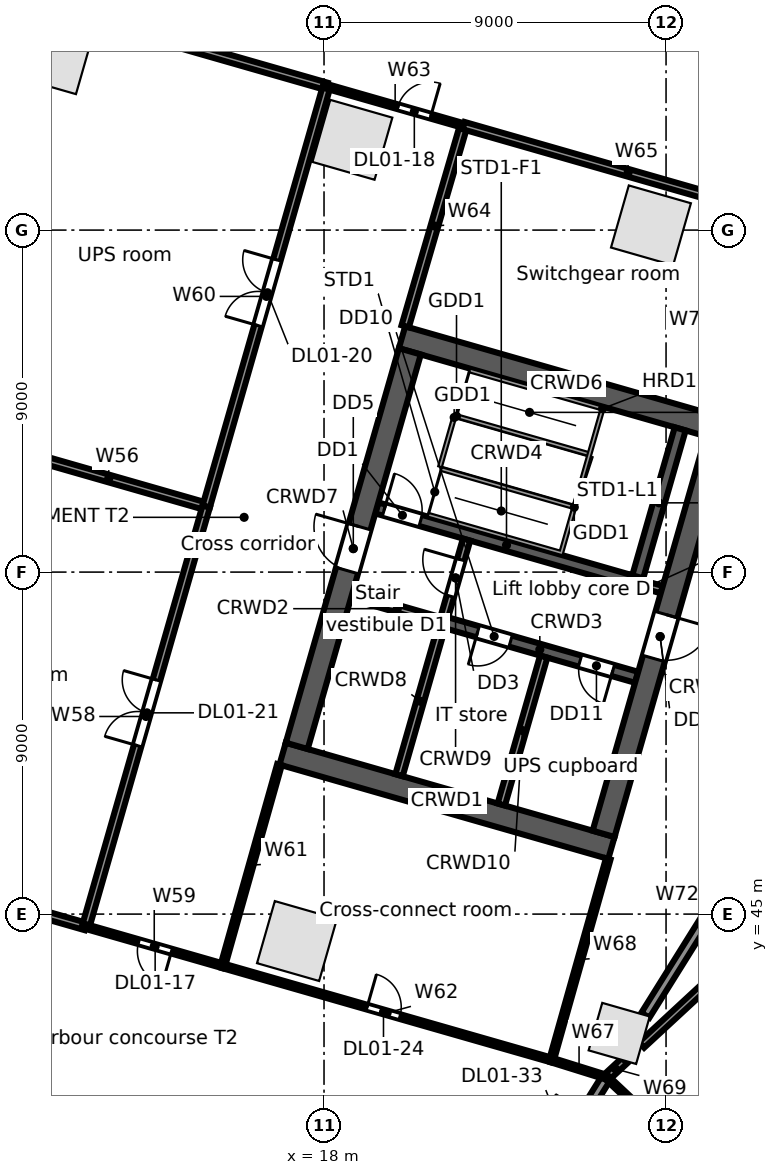
"""IFC4 building model, lengths in metres.
Left out: names, types, materials, properties, quantities, classifications, styles, units other than length and angle.
Written with IfcOpenShell. Run it as: python <this file> out.ifc"""

import sys

from ifc_helpers import new_model, si_unit, direction, frame, frame_2d, origin, origin_2d, place, context, subcontext, project, spatial, rectangle, extrude, element, fill, save


model = new_model("IFC4")
c1 = context("Model", 3, precision=1e-05, world=origin(), true_north=direction((0.0, 1.0)))
c2 = subcontext(c1, "Body", "Model", "MODEL_VIEW")
j1 = project(units=[si_unit("LENGTHUNIT", "METRE"), si_unit("PLANEANGLEUNIT", "RADIAN")], contexts=[c1])
p1 = place(None, origin())
s1 = spatial("IfcSite", under=j1, at=p1, CompositionType="ELEMENT")
p2 = place(p1, origin())
s2 = spatial("IfcBuilding", under=s1, at=p2, CompositionType="ELEMENT")
p3 = place(p2, frame((0.0, 0.0, 11.5)))
s3 = spatial("IfcBuildingStorey", under=s2, at=p3, CompositionType="ELEMENT", Elevation=11.5)
for number, where, z_axis, x_axis in (
    (1, (26.603, 63.124, 0.0), (0.0, 0.0, 1.0), (-0.961, 0.276, 0.0)),
    (2, (18.746, 65.376, 0.0), (0.0, 0.0, 1.0), (-0.961, 0.276, 0.0)),
    (3, (10.89, 67.629, 0.0), (0.0, 0.0, 1.0), (-0.961, 0.276, 0.0)),
    (4, (17.288, 44.291, 0.0), (0.0, 0.0, 1.0), (0.961, -0.276, 0.0)),
):
    element("IfcColumn", number, at=place(p3, frame(where, z_axis=z_axis, x_axis=x_axis)), inside=s3, PredefinedType="COLUMN", context=c2, shape_type="SweptSolid", body=[
        extrude(rectangle(XDim=1.7, YDim=1.7, at=origin_2d()), origin(), (0.0, 0.0, 1.0), 5.0),
    ])
p4 = place(p3, frame((25.767, 41.86, 0.0), z_axis=(0.0, 0.0, 1.0), x_axis=(0.961261695938, -0.275637355817, 0.0)))
e5 = element("IfcColumn", 5, at=p4, inside=s3, PredefinedType="COLUMN", context=c2, shape_type="SweptSolid", body=[
    extrude(rectangle(XDim=1.3, YDim=1.3, at=origin_2d()), origin(), (0.0, 0.0, 1.0), 5.0),
])
p5 = place(p3, frame((28.316, 68.25, 0.0), z_axis=(0.0, 0.0, 1.0), x_axis=(-0.961261695938, 0.275637355817, 0.0)))
e6 = element("IfcColumn", 6, at=p5, inside=s3, PredefinedType="COLUMN", context=c2, shape_type="SweptSolid", body=[
    extrude(rectangle(XDim=1.0, YDim=1.0, at=origin_2d()), origin(), (0.0, 0.0, 1.0), 5.0),
])
p6 = place(p3, frame((16.911, 49.221, 0.0), z_axis=(0.0, 0.0, 1.0), x_axis=(0.96126248289, -0.275634611374, 0.0)))
e7 = element("IfcWall", 7, at=p6, inside=s3, PredefinedType="SOLIDWALL", context=c2, shape_type="SweptSolid", body=[
    extrude(rectangle(XDim=9.0, YDim=0.6, at=frame_2d((4.5, 0.0))), origin(), (0.0, 0.0, 1.0), 4.65),
])
p7 = place(p3, frame((18.728, 53.382, 0.0), z_axis=(0.0, 0.0, 1.0), x_axis=(0.961247070632, -0.275688355216, 0.0)))
e8 = element("IfcWall", 8, at=p7, inside=s3, PredefinedType="SOLIDWALL", context=c2, shape_type="SweptSolid", body=[
    extrude(rectangle(XDim=2.5, YDim=0.2, at=frame_2d((1.25, 0.0))), origin(), (0.0, 0.0, 1.0), 4.65),
])
p8 = place(p3, frame((21.131, 52.692, 0.0), z_axis=(0.0, 0.0, 1.0), x_axis=(0.961271492568, -0.275603188616, 0.0)))
e9 = element("IfcWall", 9, at=p8, inside=s3, PredefinedType="SOLIDWALL", context=c2, shape_type="SweptSolid", body=[
    extrude(rectangle(XDim=5.3, YDim=0.3, at=frame_2d((2.65, 0.0))), origin(), (0.0, 0.0, 1.0), 4.65),
])
p9 = place(p8, frame((0.95, 0.0, 0.0)))
e10 = element("IfcOpeningElement", 10, at=p9, cuts=e9, PredefinedType="OPENING", context=c2, shape_type="SweptSolid", body=[
    extrude(rectangle(XDim=0.9, YDim=2.1, at=frame_2d((0.45, 1.05))), frame((0.0, 0.16, 0.0), z_axis=(0.0, -1.0, 0.0), x_axis=(1.0, 0.0, 0.0)), (0.0, 0.0, 1.0), 0.32),
])
p10 = place(p8, frame((3.75, 0.0, 0.0)))
e11 = element("IfcOpeningElement", 11, at=p10, cuts=e9, PredefinedType="OPENING", context=c2, shape_type="SweptSolid", body=[
    extrude(rectangle(XDim=0.9, YDim=2.1, at=frame_2d((0.45, 1.05))), frame((0.0, 0.16, 0.0), z_axis=(0.0, -1.0, 0.0), x_axis=(1.0, 0.0, 0.0)), (0.0, 0.0, 1.0), 0.32),
])
p11 = place(p3, frame((19.389, 55.689, 0.0), z_axis=(0.0, 0.0, 1.0), x_axis=(0.961261397636, -0.275638396117, 0.0)))
e12 = element("IfcWall", 12, at=p11, inside=s3, PredefinedType="SOLIDWALL", context=c2, shape_type="SweptSolid", body=[
    extrude(rectangle(XDim=7.1, YDim=0.3, at=frame_2d((3.55, 0.0))), origin(), (0.0, 0.0, 1.0), 4.65),
])
p12 = place(p11, frame((0.2, 0.0, 0.0)))
e13 = element("IfcOpeningElement", 13, at=p12, cuts=e12, PredefinedType="OPENING", context=c2, shape_type="SweptSolid", body=[
    extrude(rectangle(XDim=1.0, YDim=2.1, at=frame_2d((0.5, 1.05))), frame((0.0, 0.16, 0.0), z_axis=(0.0, -1.0, 0.0), x_axis=(1.0, 0.0, 0.0)), (0.0, 0.0, 1.0), 0.32),
])
p13 = place(p3, frame((26.214, 53.732, 0.0), z_axis=(0.0, 0.0, 1.0), x_axis=(0.96122076476, -0.27578005982, 0.0)))
e14 = element("IfcWall", 14, at=p13, inside=s3, PredefinedType="SOLIDWALL", context=c2, shape_type="SweptSolid", body=[
    extrude(rectangle(XDim=0.7, YDim=0.2, at=frame_2d((0.35, 0.0))), origin(), (0.0, 0.0, 1.0), 4.65),
])
p14 = place(p3, frame((20.053, 60.18, 0.0), z_axis=(0.0, 0.0, 1.0), x_axis=(0.96126248289, -0.275634611374, 0.0)))
e15 = element("IfcWall", 15, at=p14, inside=s3, PredefinedType="SOLIDWALL", context=c2, shape_type="SweptSolid", body=[
    extrude(rectangle(XDim=9.0, YDim=0.6, at=frame_2d((4.5, 0.0))), origin(), (0.0, 0.0, 1.0), 4.65),
])
p15 = place(p3, frame((17.282, 49.427, 0.0), z_axis=(0.0, 0.0, 1.0), x_axis=(0.275631631629, 0.961263337304, 0.0)))
e16 = element("IfcWall", 16, at=p15, inside=s3, PredefinedType="SOLIDWALL", context=c2, shape_type="SweptSolid", body=[
    extrude(rectangle(XDim=10.8, YDim=0.6, at=frame_2d((5.4, 0.0))), origin(), (0.0, 0.0, 1.0), 4.65),
])
p16 = place(p15, frame((4.8, 0.0, 0.0)))
e17 = element("IfcOpeningElement", 17, at=p16, cuts=e16, PredefinedType="OPENING", context=c2, shape_type="SweptSolid", body=[
    extrude(rectangle(XDim=1.2, YDim=2.1, at=frame_2d((0.6, 1.05))), frame((0.0, 0.31, 0.0), z_axis=(0.0, -1.0, 0.0), x_axis=(1.0, 0.0, 0.0)), (0.0, 0.0, 1.0), 0.62),
])
p17 = place(p3, frame((19.973, 48.655, 0.0), z_axis=(0.0, 0.0, 1.0), x_axis=(0.275668441653, 0.961252781674, 0.0)))
e18 = element("IfcWall", 18, at=p17, inside=s3, PredefinedType="SOLIDWALL", context=c2, shape_type="SweptSolid", body=[
    extrude(rectangle(XDim=4.05, YDim=0.2, at=frame_2d((2.025, 0.0))), origin(), (0.0, 0.0, 1.0), 4.65),
])
p18 = place(p3, frame((21.172, 52.837, 0.0), z_axis=(0.0, 0.0, 1.0), x_axis=(0.275657676022, 0.961255868981, 0.0)))
e19 = element("IfcWall", 19, at=p18, inside=s3, PredefinedType="PARTITIONING", context=c2, shape_type="SweptSolid", body=[
    extrude(rectangle(XDim=2.1, YDim=0.2, at=frame_2d((1.05, 0.0))), origin(), (0.0, 0.0, 1.0), 4.65),
])
p19 = place(p18, frame((0.55, 0.0, 0.0)))
e20 = element("IfcOpeningElement", 20, at=p19, cuts=e19, PredefinedType="OPENING", context=c2, shape_type="SweptSolid", body=[
    extrude(rectangle(XDim=1.0, YDim=2.1, at=frame_2d((0.5, 1.05))), frame((0.0, 0.11, 0.0), z_axis=(0.0, -1.0, 0.0), x_axis=(1.0, 0.0, 0.0)), (0.0, 0.0, 1.0), 0.22),
])
p20 = place(p3, frame((22.665, 47.883, 0.0), z_axis=(0.0, 0.0, 1.0), x_axis=(0.275596769212, 0.961273333033, 0.0)))
e21 = element("IfcWall", 21, at=p20, inside=s3, PredefinedType="PARTITIONING", context=c2, shape_type="SweptSolid", body=[
    extrude(rectangle(XDim=4.05, YDim=0.2, at=frame_2d((2.025, 0.0))), origin(), (0.0, 0.0, 1.0), 4.65),
])
p21 = place(p3, frame((26.256, 53.876, 0.0), z_axis=(0.0, 0.0, 1.0), x_axis=(0.275612739511, 0.961268754209, 0.0)))
e22 = element("IfcWall", 22, at=p21, inside=s3, PredefinedType="SOLIDWALL", context=c2, shape_type="SweptSolid", body=[
    extrude(rectangle(XDim=4.05, YDim=0.3, at=frame_2d((2.025, 0.0))), origin(), (0.0, 0.0, 1.0), 4.65),
])
p22 = place(p3, frame((25.356, 47.112, 0.0), z_axis=(0.0, 0.0, 1.0), x_axis=(0.275631631629, 0.961263337304, 0.0)))
e23 = element("IfcWall", 23, at=p22, inside=s3, PredefinedType="SOLIDWALL", context=c2, shape_type="SweptSolid", body=[
    extrude(rectangle(XDim=10.8, YDim=0.6, at=frame_2d((5.4, 0.0))), origin(), (0.0, 0.0, 1.0), 4.65),
])
p23 = place(p22, frame((4.8, 0.0, 0.0)))
e24 = element("IfcOpeningElement", 24, at=p23, cuts=e23, PredefinedType="OPENING", context=c2, shape_type="SweptSolid", body=[
    extrude(rectangle(XDim=1.2, YDim=2.1, at=frame_2d((0.6, 1.05))), frame((0.0, 0.31, 0.0), z_axis=(0.0, -1.0, 0.0), x_axis=(1.0, 0.0, 0.0)), (0.0, 0.0, 1.0), 0.62),
])
p24 = place(p3, frame((4.28, 46.809, 0.0), z_axis=(0.0, 0.0, 1.0), x_axis=(0.961270337968, -0.275607215693, 0.0)))
e25 = element("IfcWall", 25, at=p24, inside=s3, PredefinedType="PARTITIONING", context=c2, shape_type="SweptSolid", body=[
    extrude(rectangle(XDim=7.75, YDim=0.2, at=frame_2d((3.875, 0.0))), origin(), (0.0, 0.0, 1.0), 4.03),
])
p25 = place(p3, frame((9.77, 57.199, 0.0), z_axis=(0.0, 0.0, 1.0), x_axis=(0.961262835898, -0.275633380273, 0.0)))
e26 = element("IfcWall", 26, at=p25, inside=s3, PredefinedType="PARTITIONING", context=c2, shape_type="SweptSolid", body=[
    extrude(rectangle(XDim=5.337, YDim=0.2, at=frame_2d((2.668, 0.0))), origin(), (0.0, 0.0, 1.0), 3.712),
])
p26 = place(p3, frame((10.62, 68.918, 0.0), z_axis=(0.0, 0.0, 1.0), x_axis=(0.961260764876, -0.275640602796, 0.0)))
e27 = element("IfcWall", 27, at=p26, inside=s3, PredefinedType="PARTITIONING", context=c2, shape_type="SweptSolid", body=[
    extrude(rectangle(XDim=7.749, YDim=0.2, at=frame_2d((3.875, 0.0))), origin(), (0.0, 0.0, 1.0), 3.712),
])
p27 = place(p3, frame((11.73, 44.673, 0.0), z_axis=(0.0, 0.0, 1.0), x_axis=(0.275635044812, 0.961262358605, 0.0)))
e28 = element("IfcWall", 28, at=p27, inside=s3, PredefinedType="PARTITIONING", context=c2, shape_type="SweptSolid", body=[
    extrude(rectangle(XDim=11.5, YDim=0.2, at=frame_2d((5.75, 0.0))), origin(), (0.0, 0.0, 1.0), 3.712),
])
p28 = place(p27, frame((4.95, 0.0, 0.0)))
e29 = element("IfcOpeningElement", 29, at=p28, cuts=e28, PredefinedType="OPENING", context=c2, shape_type="SweptSolid", body=[
    extrude(rectangle(XDim=1.8, YDim=2.1, at=frame_2d((0.9, 1.05))), frame((0.0, 0.11, 0.0), z_axis=(0.0, -1.0, 0.0), x_axis=(1.0, 0.0, 0.0)), (0.0, 0.0, 1.0), 0.22),
])
p29 = place(p3, frame((11.73, 44.673, 0.0), z_axis=(0.0, 0.0, 1.0), x_axis=(0.961228613303, -0.275752702557, 0.0)))
e30 = element("IfcWall", 30, at=p29, inside=s3, PredefinedType="PARTITIONING", context=c2, shape_type="SweptSolid", body=[
    extrude(rectangle(XDim=3.75, YDim=0.125, at=frame_2d((1.875, 0.0))), origin(), (0.0, 0.0, 1.0), 4.65),
])
p30 = place(p29, frame((1.45, 0.0, 0.0)))
e31 = element("IfcOpeningElement", 31, at=p30, cuts=e30, PredefinedType="OPENING", context=c2, shape_type="SweptSolid", body=[
    extrude(rectangle(XDim=0.9, YDim=2.1, at=frame_2d((0.45, 1.05))), frame((0.0, 0.073, 0.0), z_axis=(0.0, -1.0, 0.0), x_axis=(1.0, 0.0, 0.0)), (0.0, 0.0, 1.0), 0.145),
])
p31 = place(p3, frame((14.9, 55.728, 0.0), z_axis=(0.0, 0.0, 1.0), x_axis=(0.27559869205, 0.961272781754, 0.0)))
e32 = element("IfcWall", 32, at=p31, inside=s3, PredefinedType="PARTITIONING", context=c2, shape_type="SweptSolid", body=[
    extrude(rectangle(XDim=11.499, YDim=0.2, at=frame_2d((5.75, 0.0))), origin(), (0.0, 0.0, 1.0), 3.712),
])
p32 = place(p31, frame((4.95, 0.0, 0.0)))
e33 = element("IfcOpeningElement", 33, at=p32, cuts=e32, PredefinedType="OPENING", context=c2, shape_type="SweptSolid", body=[
    extrude(rectangle(XDim=1.8, YDim=2.1, at=frame_2d((0.9, 1.05))), frame((0.0, 0.11, 0.0), z_axis=(0.0, -1.0, 0.0), x_axis=(1.0, 0.0, 0.0)), (0.0, 0.0, 1.0), 0.22),
])
p33 = place(p3, frame((15.335, 43.639, 0.0), z_axis=(0.0, 0.0, 1.0), x_axis=(0.271407455373, 0.962464541252, 0.0)))
e34 = element("IfcWall", 34, at=p33, inside=s3, PredefinedType="PARTITIONING", context=c2, shape_type="SweptSolid", body=[
    extrude(rectangle(XDim=5.501, YDim=0.125, at=frame_2d((2.75, 0.0))), origin(), (0.0, 0.0, 1.0), 3.93),
])
p34 = place(p3, frame((15.335, 43.639, 0.0), z_axis=(0.0, 0.0, 1.0), x_axis=(0.961281982754, -0.275566597455, 0.0)))
e35 = element("IfcWall", 35, at=p34, inside=s3, PredefinedType="PARTITIONING", context=c2, shape_type="SweptSolid", body=[
    extrude(rectangle(XDim=9.0, YDim=0.125, at=frame_2d((4.5, 0.0))), origin(), (0.0, 0.0, 1.0), 3.822),
])
p35 = place(p34, frame((3.95, 0.0, 0.0)))
e36 = element("IfcOpeningElement", 36, at=p35, cuts=e35, PredefinedType="OPENING", context=c2, shape_type="SweptSolid", body=[
    extrude(rectangle(XDim=0.9, YDim=2.1, at=frame_2d((0.45, 1.05))), frame((0.0, 0.073, 0.0), z_axis=(0.0, -1.0, 0.0), x_axis=(1.0, 0.0, 0.0)), (0.0, 0.0, 1.0), 0.145),
])
p36 = place(p3, frame((18.069, 66.782, 0.0), z_axis=(0.0, 0.0, 1.0), x_axis=(0.961314848061, -0.275451924837, 0.0)))
e37 = element("IfcWall", 37, at=p36, inside=s3, PredefinedType="PARTITIONING", context=c2, shape_type="SweptSolid", body=[
    extrude(rectangle(XDim=3.75, YDim=0.125, at=frame_2d((1.875, 0.0))), origin(), (0.0, 0.0, 1.0), 3.712),
])
p37 = place(p36, frame((1.95, 0.0, 0.0)))
e38 = element("IfcOpeningElement", 38, at=p37, cuts=e37, PredefinedType="OPENING", context=c2, shape_type="SweptSolid", body=[
    extrude(rectangle(XDim=0.9, YDim=2.1, at=frame_2d((0.45, 1.05))), frame((0.0, 0.073, 0.0), z_axis=(0.0, -1.0, 0.0), x_axis=(1.0, 0.0, 0.0)), (0.0, 0.0, 1.0), 0.145),
])
p38 = place(p3, frame((20.136, 60.468, 0.0), z_axis=(0.0, 0.0, 1.0), x_axis=(0.279630121779, 0.96010780384, 0.0)))
e39 = element("IfcWall", 39, at=p38, inside=s3, PredefinedType="PARTITIONING", context=c2, shape_type="SweptSolid", body=[
    extrude(rectangle(XDim=5.5, YDim=0.2, at=frame_2d((2.75, 0.0))), origin(), (0.0, 0.0, 1.0), 4.018),
])
p39 = place(p3, frame((21.674, 65.749, 0.0), z_axis=(0.0, 0.0, 1.0), x_axis=(0.961259417468, -0.275645301662, 0.0)))
e40 = element("IfcWall", 40, at=p39, inside=s3, PredefinedType="PARTITIONING", context=c2, shape_type="SweptSolid", body=[
    extrude(rectangle(XDim=9.0, YDim=0.2, at=frame_2d((4.5, 0.0))), origin(), (0.0, 0.0, 1.0), 3.822),
])
p40 = place(p3, frame((23.397, 37.442, 0.0), z_axis=(0.0, 0.0, 1.0), x_axis=(0.529805058875, 0.848119448893, 0.0)))
e41 = element("IfcWall", 41, at=p40, inside=s3, PredefinedType="PARTITIONING", context=c2, shape_type="SweptSolid", body=[
    extrude(rectangle(XDim=3.849, YDim=0.25, at=frame_2d((1.924, 0.0))), origin(), (0.0, 0.0, 1.0), 3.712),
])
p41 = place(p40, frame((0.95, 0.0, 0.0)))
e42 = element("IfcOpeningElement", 42, at=p41, cuts=e41, PredefinedType="OPENING", context=c2, shape_type="SweptSolid", body=[
    extrude(rectangle(XDim=1.8, YDim=2.1, at=frame_2d((0.9, 1.05))), frame((0.0, 0.135, 0.0), z_axis=(0.0, -1.0, 0.0), x_axis=(1.0, 0.0, 0.0)), (0.0, 0.0, 1.0), 0.27),
])
p42 = place(p3, frame((23.986, 41.159, 0.0), z_axis=(0.0, 0.0, 1.0), x_axis=(0.954522865266, -0.298137719325, 0.0)))
e43 = element("IfcWall", 43, at=p42, inside=s3, PredefinedType="PARTITIONING", context=c2, shape_type="SweptSolid", body=[
    extrude(rectangle(XDim=1.519, YDim=0.125, at=frame_2d((0.76, 0.0))), origin(), (0.0, 0.0, 1.0), 3.712),
])
p43 = place(p3, frame((23.986, 41.159, 0.0), z_axis=(0.0, 0.0, 1.0), x_axis=(0.271465437068, 0.962448188983, 0.0)))
e44 = element("IfcWall", 44, at=p43, inside=s3, PredefinedType="PARTITIONING", context=c2, shape_type="SweptSolid", body=[
    extrude(rectangle(XDim=5.5, YDim=0.125, at=frame_2d((2.75, 0.0))), origin(), (0.0, 0.0, 1.0), 3.93),
])
p44 = place(p3, frame((25.436, 40.706, 0.0), z_axis=(0.0, 0.0, 1.0), x_axis=(0.733725630695, 0.679445876329, 0.0)))
e45 = element("IfcWall", 45, at=p44, inside=s3, PredefinedType="PARTITIONING", context=c2, shape_type="SweptSolid", body=[
    extrude(rectangle(XDim=0.643, YDim=0.2, at=frame_2d((0.322, 0.0))), origin(), (0.0, 0.0, 1.0), 4.65),
])
p45 = place(p3, frame((25.436, 40.706, 0.0), z_axis=(0.0, 0.0, 1.0), x_axis=(0.729011488135, -0.684501461041, 0.0)))
e46 = element("IfcWall", 46, at=p45, inside=s3, PredefinedType="PARTITIONING", context=c2, shape_type="SweptSolid", body=[
    extrude(rectangle(XDim=4.202, YDim=0.125, at=frame_2d((2.101, 0.0))), origin(), (0.0, 0.0, 1.0), 4.65),
])
p46 = place(p45, frame((1.7, 0.0, 0.0)))
e47 = element("IfcOpeningElement", 47, at=p46, cuts=e46, PredefinedType="OPENING", context=c2, shape_type="SweptSolid", body=[
    extrude(rectangle(XDim=0.9, YDim=2.1, at=frame_2d((0.45, 1.05))), frame((0.0, 0.073, 0.0), z_axis=(0.0, -1.0, 0.0), x_axis=(1.0, 0.0, 0.0)), (0.0, 0.0, 1.0), 0.145),
])
p47 = place(p3, frame((26.356, 41.557, 0.0), z_axis=(0.0, 0.0, 1.0), x_axis=(0.734047402287, 0.679098233834, 0.0)))
e48 = element("IfcWall", 48, at=p47, inside=s3, PredefinedType="PARTITIONING", context=c2, shape_type="SweptSolid", body=[
    extrude(rectangle(XDim=21.926, YDim=0.2, at=frame_2d((10.963, 0.0))), origin(), (0.0, 0.0, 1.0), 3.73),
])
p48 = place(p47, frame((9.95, 0.0, 0.0)))
e49 = element("IfcOpeningElement", 49, at=p48, cuts=e48, PredefinedType="OPENING", context=c2, shape_type="SweptSolid", body=[
    extrude(rectangle(XDim=1.8, YDim=2.1, at=frame_2d((0.9, 1.05))), frame((0.0, 0.11, 0.0), z_axis=(0.0, -1.0, 0.0), x_axis=(1.0, 0.0, 0.0)), (0.0, 0.0, 1.0), 0.22),
])
p49 = place(p3, frame((26.456, 42.338, 0.0), z_axis=(0.0, 0.0, 1.0), x_axis=(0.529836963461, 0.848099517834, 0.0)))
e50 = element("IfcWall", 50, at=p49, inside=s3, PredefinedType="PARTITIONING", context=c2, shape_type="SweptSolid", body=[
    extrude(rectangle(XDim=5.826, YDim=0.25, at=frame_2d((2.913, 0.0))), origin(), (0.0, 0.0, 1.0), 3.712),
])
p50 = place(p12, origin())
e51 = element("IfcDoor", 51, at=p50, inside=s3, OperationType="SINGLE_SWING_LEFT", PredefinedType="DOOR", context=c2, shape_type="SweptSolid", body=[
    extrude(rectangle(XDim=1.0, YDim=2.1, at=frame_2d((0.5, 1.05))), frame((0.0, 0.025, 0.0), z_axis=(0.0, -1.0, 0.0), x_axis=(1.0, 0.0, 0.0)), (0.0, 0.0, 1.0), 0.05),
])
fill(e13, e51)
p51 = place(p19, origin())
e52 = element("IfcDoor", 52, at=p51, inside=s3, OperationType="SINGLE_SWING_RIGHT", PredefinedType="DOOR", context=c2, shape_type="SweptSolid", body=[
    extrude(rectangle(XDim=1.0, YDim=2.1, at=frame_2d((0.5, 1.05))), frame((0.0, 0.025, 0.0), z_axis=(0.0, -1.0, 0.0), x_axis=(1.0, 0.0, 0.0)), (0.0, 0.0, 1.0), 0.05),
])
fill(e20, e52)
p52 = place(p16, origin())
e53 = element("IfcDoor", 53, at=p52, inside=s3, OperationType="SINGLE_SWING_RIGHT", PredefinedType="DOOR", context=c2, shape_type="SweptSolid", body=[
    extrude(rectangle(XDim=1.2, YDim=2.1, at=frame_2d((0.6, 1.05))), frame((0.0, 0.025, 0.0), z_axis=(0.0, -1.0, 0.0), x_axis=(1.0, 0.0, 0.0)), (0.0, 0.0, 1.0), 0.05),
])
fill(e17, e53)
p53 = place(p23, frame((1.2, 0.0, 0.0), z_axis=(0.0, 0.0, 1.0), x_axis=(-1.0, 0.0, 0.0)))
e54 = element("IfcDoor", 54, at=p53, inside=s3, OperationType="SINGLE_SWING_LEFT", PredefinedType="DOOR", context=c2, shape_type="SweptSolid", body=[
    extrude(rectangle(XDim=1.2, YDim=2.1, at=frame_2d((0.6, 1.05))), frame((0.0, 0.025, 0.0), z_axis=(0.0, -1.0, 0.0), x_axis=(1.0, 0.0, 0.0)), (0.0, 0.0, 1.0), 0.05),
])
fill(e24, e54)
p54 = place(p9, frame((0.9, 0.0, 0.0), z_axis=(0.0, 0.0, 1.0), x_axis=(-1.0, 0.0, 0.0)))
e55 = element("IfcDoor", 55, at=p54, inside=s3, OperationType="SINGLE_SWING_RIGHT", PredefinedType="DOOR", context=c2, shape_type="SweptSolid", body=[
    extrude(rectangle(XDim=0.9, YDim=2.1, at=frame_2d((0.45, 1.05))), frame((0.0, 0.025, 0.0), z_axis=(0.0, -1.0, 0.0), x_axis=(1.0, 0.0, 0.0)), (0.0, 0.0, 1.0), 0.05),
])
fill(e10, e55)
p55 = place(p10, frame((0.9, 0.0, 0.0), z_axis=(0.0, 0.0, 1.0), x_axis=(-1.0, 0.0, 0.0)))
e56 = element("IfcDoor", 56, at=p55, inside=s3, OperationType="SINGLE_SWING_LEFT", PredefinedType="DOOR", context=c2, shape_type="SweptSolid", body=[
    extrude(rectangle(XDim=0.9, YDim=2.1, at=frame_2d((0.45, 1.05))), frame((0.0, 0.025, 0.0), z_axis=(0.0, -1.0, 0.0), x_axis=(1.0, 0.0, 0.0)), (0.0, 0.0, 1.0), 0.05),
])
fill(e11, e56)
p56 = place(p30, frame((0.9, 0.0, 0.0), z_axis=(0.0, 0.0, 1.0), x_axis=(-1.0, 0.0, 0.0)))
e57 = element("IfcDoor", 57, at=p56, inside=s3, OperationType="SINGLE_SWING_LEFT", PredefinedType="DOOR", context=c2, shape_type="SweptSolid", body=[
    extrude(rectangle(XDim=0.9, YDim=2.1, at=frame_2d((0.45, 1.05))), frame((0.0, 0.025, 0.0), z_axis=(0.0, -1.0, 0.0), x_axis=(1.0, 0.0, 0.0)), (0.0, 0.0, 1.0), 0.05),
])
fill(e31, e57)
p57 = place(p37, origin())
e58 = element("IfcDoor", 58, at=p57, inside=s3, OperationType="SINGLE_SWING_RIGHT", PredefinedType="DOOR", context=c2, shape_type="SweptSolid", body=[
    extrude(rectangle(XDim=0.9, YDim=2.1, at=frame_2d((0.45, 1.05))), frame((0.0, 0.025, 0.0), z_axis=(0.0, -1.0, 0.0), x_axis=(1.0, 0.0, 0.0)), (0.0, 0.0, 1.0), 0.05),
])
fill(e38, e58)
p58 = place(p32, origin())
e59 = element("IfcDoor", 59, at=p58, inside=s3, OperationType="DOUBLE_DOOR_SINGLE_SWING", PredefinedType="DOOR", context=c2, shape_type="SweptSolid", body=[
    extrude(rectangle(XDim=1.8, YDim=2.1, at=frame_2d((0.9, 1.05))), frame((0.0, 0.025, 0.0), z_axis=(0.0, -1.0, 0.0), x_axis=(1.0, 0.0, 0.0)), (0.0, 0.0, 1.0), 0.05),
])
fill(e33, e59)
p59 = place(p28, origin())
e60 = element("IfcDoor", 60, at=p59, inside=s3, OperationType="DOUBLE_DOOR_SINGLE_SWING", PredefinedType="DOOR", context=c2, shape_type="SweptSolid", body=[
    extrude(rectangle(XDim=1.8, YDim=2.1, at=frame_2d((0.9, 1.05))), frame((0.0, 0.025, 0.0), z_axis=(0.0, -1.0, 0.0), x_axis=(1.0, 0.0, 0.0)), (0.0, 0.0, 1.0), 0.05),
])
fill(e29, e60)
p60 = place(p35, origin())
e61 = element("IfcDoor", 61, at=p60, inside=s3, OperationType="SINGLE_SWING_LEFT", PredefinedType="DOOR", context=c2, shape_type="SweptSolid", body=[
    extrude(rectangle(XDim=0.9, YDim=2.1, at=frame_2d((0.45, 1.05))), frame((0.0, 0.025, 0.0), z_axis=(0.0, -1.0, 0.0), x_axis=(1.0, 0.0, 0.0)), (0.0, 0.0, 1.0), 0.05),
])
fill(e36, e61)
save(model, sys.argv[1])
